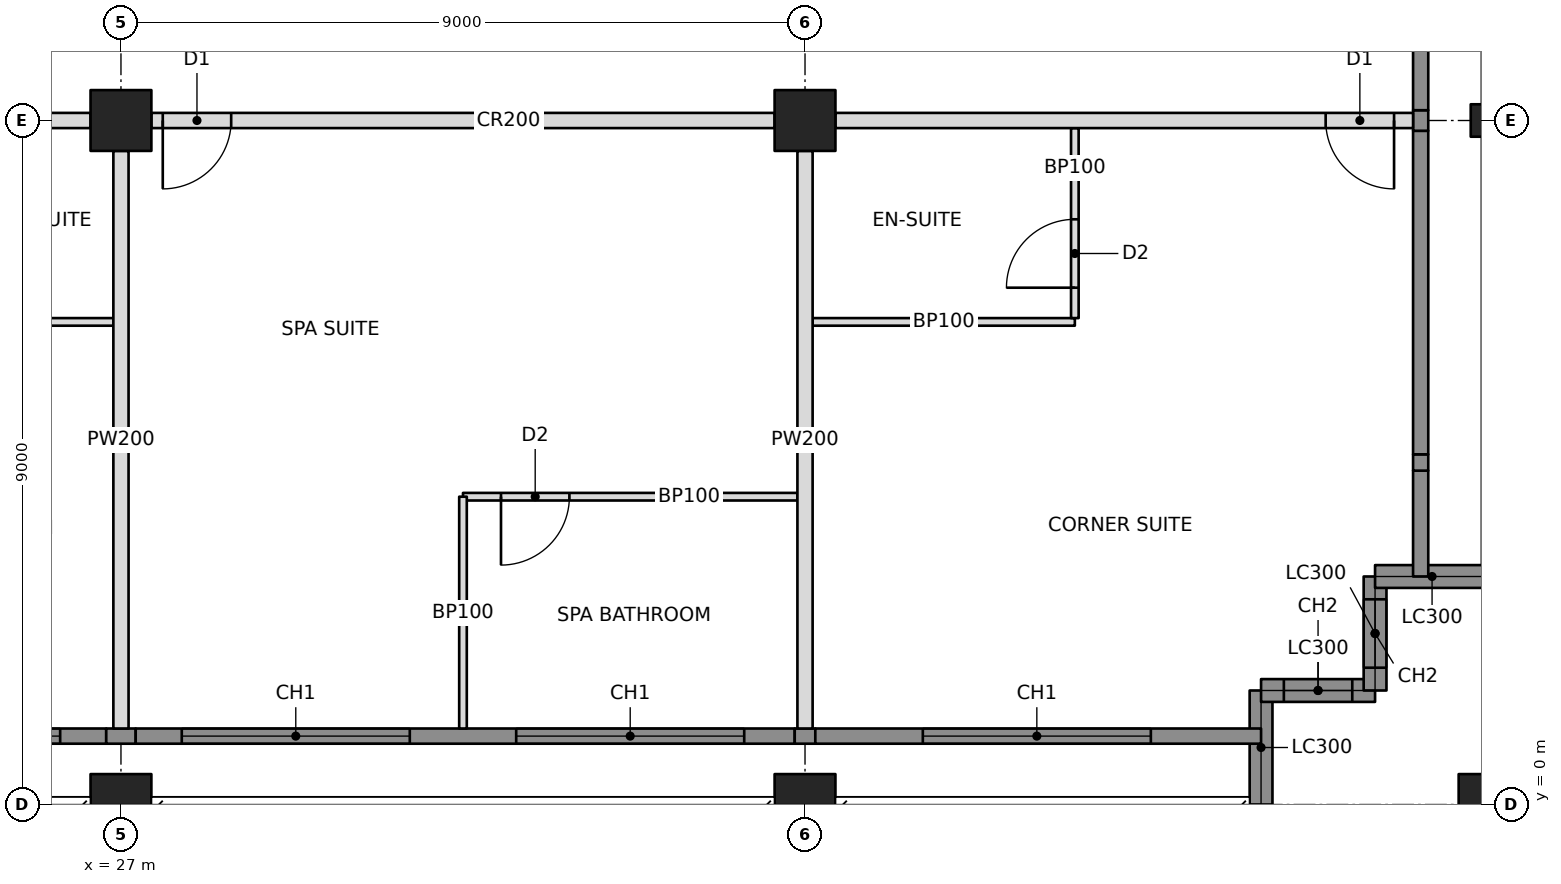
"""IFC4 building model, lengths in metres.
Left out: names, types, materials, properties, quantities, classifications, styles, units other than length and angle.
Written with IfcOpenShell. Run it as: python <this file> out.ifc"""

import sys

from ifc_helpers import new_model, si_unit, direction, frame, frame_2d, origin, origin_2d, place, context, subcontext, project, spatial, rectangle, hollow_rectangle, i_section, extrude, element, fill, save


model = new_model("IFC4")
c1 = context("Model", 3, precision=1e-05, world=origin(), true_north=direction((0.0, 1.0)))
c2 = subcontext(c1, "Body", "Model", "MODEL_VIEW")
j1 = project(units=[si_unit("LENGTHUNIT", "METRE"), si_unit("PLANEANGLEUNIT", "RADIAN")], contexts=[c1])
p1 = place(None, origin())
s1 = spatial("IfcSite", under=j1, at=p1, CompositionType="ELEMENT")
p2 = place(p1, origin())
s2 = spatial("IfcBuilding", under=s1, at=p2, CompositionType="ELEMENT")
p3 = place(p2, frame((0.0, 0.0, 194.4)))
s3 = spatial("IfcBuildingStorey", under=s2, at=p3, CompositionType="ELEMENT", Elevation=194.4)
p4 = place(p3, frame((27.0, 0.0, 0.0), z_axis=(0.0, 0.0, 1.0), x_axis=(1.0, 0.0, 0.0)))
e1 = element("IfcColumn", 1, at=p4, inside=s3, PredefinedType="COLUMN", context=c2, shape_type="SweptSolid", body=[
    extrude(hollow_rectangle(XDim=0.8, YDim=0.8, WallThickness=0.06, at=origin_2d()), origin(), (0.0, 0.0, 1.0), 3.4),
])
p5 = place(p3, frame((27.0, 9.0, 0.0), z_axis=(0.0, 0.0, 1.0), x_axis=(1.0, 0.0, 0.0)))
e2 = element("IfcColumn", 2, at=p5, inside=s3, PredefinedType="COLUMN", context=c2, shape_type="SweptSolid", body=[
    extrude(hollow_rectangle(XDim=0.8, YDim=0.8, WallThickness=0.05, at=origin_2d()), origin(), (0.0, 0.0, 1.0), 3.4),
])
p6 = place(p3, frame((36.0, 0.0, 0.0), z_axis=(0.0, 0.0, 1.0), x_axis=(1.0, 0.0, 0.0)))
e3 = element("IfcColumn", 3, at=p6, inside=s3, PredefinedType="COLUMN", context=c2, shape_type="SweptSolid", body=[
    extrude(hollow_rectangle(XDim=0.8, YDim=0.8, WallThickness=0.06, at=origin_2d()), origin(), (0.0, 0.0, 1.0), 3.4),
])
p7 = place(p3, frame((36.0, 9.0, 0.0), z_axis=(0.0, 0.0, 1.0), x_axis=(0.0, 1.0, 0.0)))
e4 = element("IfcColumn", 4, at=p7, inside=s3, PredefinedType="COLUMN", context=c2, shape_type="SweptSolid", body=[
    extrude(hollow_rectangle(XDim=0.8, YDim=0.8, WallThickness=0.05, at=origin_2d()), origin(), (0.0, 0.0, 1.0), 3.4),
])
p8 = place(p3, frame((45.0, 0.0, 0.0), z_axis=(0.0, 0.0, 1.0), x_axis=(1.0, 0.0, 0.0)))
e5 = element("IfcColumn", 5, at=p8, inside=s3, PredefinedType="COLUMN", context=c2, shape_type="SweptSolid", body=[
    extrude(hollow_rectangle(XDim=0.8, YDim=0.8, WallThickness=0.06, at=origin_2d()), origin(), (0.0, 0.0, 1.0), 3.4),
])
p9 = place(p3, frame((45.0, 9.0, 0.0), z_axis=(0.0, 0.0, 1.0), x_axis=(0.0, 1.0, 0.0)))
e6 = element("IfcColumn", 6, at=p9, inside=s3, PredefinedType="COLUMN", context=c2, shape_type="SweptSolid", body=[
    extrude(i_section(OverallWidth=0.427, OverallDepth=0.483, WebThickness=0.051, FlangeThickness=0.082, at=origin_2d()), origin(), (0.0, 0.0, 1.0), 3.4),
])
p10 = place(p3, frame((42.0, 0.0, 0.0), z_axis=(0.0, 0.0, 1.0), x_axis=(0.0, 1.0, 0.0)))
e7 = element("IfcWall", 7, at=p10, inside=s3, PredefinedType="SOLIDWALL", context=c2, shape_type="SweptSolid", body=[
    extrude(rectangle(XDim=1.5, YDim=0.3, at=frame_2d((0.75, 0.0))), origin(), (0.0, 0.0, 1.0), 2.42),
])
p11 = place(p3, frame((42.0, 1.5, 0.0), z_axis=(0.0, 0.0, 1.0), x_axis=(1.0, 0.0, 0.0)))
e8 = element("IfcWall", 8, at=p11, inside=s3, PredefinedType="SOLIDWALL", context=c2, shape_type="SweptSolid", body=[
    extrude(rectangle(XDim=1.5, YDim=0.3, at=frame_2d((0.75, 0.0))), origin(), (0.0, 0.0, 1.0), 3.2),
])
p12 = place(p11, frame((0.3, 0.0, 0.6)))
e9 = element("IfcOpeningElement", 9, at=p12, cuts=e8, PredefinedType="OPENING", context=c2, shape_type="SweptSolid", body=[
    extrude(rectangle(XDim=0.9, YDim=2.2, at=frame_2d((0.45, 1.1))), frame((0.0, 0.16, 0.0), z_axis=(0.0, -1.0, 0.0), x_axis=(1.0, 0.0, 0.0)), (0.0, 0.0, 1.0), 0.32),
])
p13 = place(p3, frame((43.5, 1.5, 0.0), z_axis=(0.0, 0.0, 1.0), x_axis=(0.0, 1.0, 0.0)))
e10 = element("IfcWall", 10, at=p13, inside=s3, PredefinedType="SOLIDWALL", context=c2, shape_type="SweptSolid", body=[
    extrude(rectangle(XDim=1.5, YDim=0.3, at=frame_2d((0.75, 0.0))), origin(), (0.0, 0.0, 1.0), 3.2),
])
p14 = place(p13, frame((0.3, 0.0, 0.6)))
e11 = element("IfcOpeningElement", 11, at=p14, cuts=e10, PredefinedType="OPENING", context=c2, shape_type="SweptSolid", body=[
    extrude(rectangle(XDim=0.9, YDim=2.2, at=frame_2d((0.45, 1.1))), frame((0.0, 0.16, 0.0), z_axis=(0.0, -1.0, 0.0), x_axis=(1.0, 0.0, 0.0)), (0.0, 0.0, 1.0), 0.32),
])
p15 = place(p3, frame((43.5, 3.0, 0.0), z_axis=(0.0, 0.0, 1.0), x_axis=(1.0, 0.0, 0.0)))
e12 = element("IfcWall", 12, at=p15, inside=s3, PredefinedType="SOLIDWALL", context=c2, shape_type="SweptSolid", body=[
    extrude(rectangle(XDim=1.5, YDim=0.3, at=frame_2d((0.75, 0.0))), origin(), (0.0, 0.0, 1.0), 2.42),
])
p16 = place(p3, frame((44.1, 3.0, 0.0), z_axis=(0.0, 0.0, 1.0), x_axis=(0.0, 1.0, 0.0)))
e13 = element("IfcWall", 13, at=p16, inside=s3, PredefinedType="SOLIDWALL", context=c2, shape_type="SweptSolid", body=[
    extrude(rectangle(XDim=1.393, YDim=0.2, at=frame_2d((0.696, 0.0))), origin(), (0.0, 0.0, 1.0), 3.2),
])
p17 = place(p3, frame((18.4, 9.0, 0.0), z_axis=(0.0, 0.0, 1.0), x_axis=(1.0, 0.0, 0.0)))
e14 = element("IfcWall", 14, at=p17, inside=s3, PredefinedType="PARTITIONING", context=c2, shape_type="SweptSolid", body=[
    extrude(rectangle(XDim=8.2, YDim=0.2, at=frame_2d((4.1, 0.0))), origin(), (0.0, 0.0, 1.0), 2.405),
])
p18 = place(p17, frame((4.35, 0.0, 0.0)))
e15 = element("IfcOpeningElement", 15, at=p18, cuts=e14, PredefinedType="OPENING", context=c2, shape_type="SweptSolid", body=[
    extrude(rectangle(XDim=0.9, YDim=2.1, at=frame_2d((0.45, 1.05))), frame((0.0, 0.11, 0.0), z_axis=(0.0, -1.0, 0.0), x_axis=(1.0, 0.0, 0.0)), (0.0, 0.0, 1.0), 0.22),
])
p19 = place(p3, frame((27.4, 9.0, 0.0), z_axis=(0.0, 0.0, 1.0), x_axis=(1.0, 0.0, 0.0)))
e16 = element("IfcWall", 16, at=p19, inside=s3, PredefinedType="PARTITIONING", context=c2, shape_type="SweptSolid", body=[
    extrude(rectangle(XDim=8.2, YDim=0.2, at=frame_2d((4.1, 0.0))), origin(), (0.0, 0.0, 1.0), 2.405),
])
p20 = place(p19, frame((0.15, 0.0, 0.0)))
e17 = element("IfcOpeningElement", 17, at=p20, cuts=e16, PredefinedType="OPENING", context=c2, shape_type="SweptSolid", body=[
    extrude(rectangle(XDim=0.9, YDim=2.1, at=frame_2d((0.45, 1.05))), frame((0.0, 0.11, 0.0), z_axis=(0.0, -1.0, 0.0), x_axis=(1.0, 0.0, 0.0)), (0.0, 0.0, 1.0), 0.22),
])
p21 = place(p3, frame((36.4, 9.0, 0.0), z_axis=(0.0, 0.0, 1.0), x_axis=(1.0, 0.0, 0.0)))
e18 = element("IfcWall", 18, at=p21, inside=s3, PredefinedType="PARTITIONING", context=c2, shape_type="SweptSolid", body=[
    extrude(rectangle(XDim=7.6, YDim=0.2, at=frame_2d((3.8, 0.0))), origin(), (0.0, 0.0, 1.0), 2.438),
])
p22 = place(p21, frame((6.45, 0.0, 0.0)))
e19 = element("IfcOpeningElement", 19, at=p22, cuts=e18, PredefinedType="OPENING", context=c2, shape_type="SweptSolid", body=[
    extrude(rectangle(XDim=0.9, YDim=2.1, at=frame_2d((0.45, 1.05))), frame((0.0, 0.11, 0.0), z_axis=(0.0, -1.0, 0.0), x_axis=(1.0, 0.0, 0.0)), (0.0, 0.0, 1.0), 0.22),
])
p23 = place(p3, frame((27.0, 8.6, 0.0), z_axis=(0.0, 0.0, 1.0), x_axis=(0.0, -1.0, 0.0)))
e20 = element("IfcWall", 20, at=p23, inside=s3, PredefinedType="PARTITIONING", context=c2, shape_type="SweptSolid", body=[
    extrude(rectangle(XDim=7.6, YDim=0.2, at=frame_2d((3.8, 0.0))), origin(), (0.0, 0.0, 1.0), 2.405),
])
p24 = place(p3, frame((36.0, 8.6, 0.0), z_axis=(0.0, 0.0, 1.0), x_axis=(0.0, -1.0, 0.0)))
e21 = element("IfcWall", 21, at=p24, inside=s3, PredefinedType="PARTITIONING", context=c2, shape_type="SweptSolid", body=[
    extrude(rectangle(XDim=7.6, YDim=0.2, at=frame_2d((3.8, 0.0))), origin(), (0.0, 0.0, 1.0), 2.438),
])
p25 = place(p3, frame((23.95, 6.35, 0.0), z_axis=(0.0, 0.0, 1.0), x_axis=(1.0, 0.0, 0.0)))
e22 = element("IfcWall", 22, at=p25, inside=s3, PredefinedType="PARTITIONING", context=c2, shape_type="SweptSolid", body=[
    extrude(rectangle(XDim=2.95, YDim=0.1, at=frame_2d((1.475, 0.0))), origin(), (0.0, 0.0, 1.0), 2.404),
])
p26 = place(p3, frame((31.5, 4.05, 0.0), z_axis=(0.0, 0.0, 1.0), x_axis=(1.0, 0.0, 0.0)))
e23 = element("IfcWall", 23, at=p26, inside=s3, PredefinedType="PARTITIONING", context=c2, shape_type="SweptSolid", body=[
    extrude(rectangle(XDim=4.4, YDim=0.1, at=frame_2d((2.2, 0.0))), origin(), (0.0, 0.0, 1.0), 2.438),
])
p27 = place(p26, frame((0.5, 0.0, 0.0)))
e24 = element("IfcOpeningElement", 24, at=p27, cuts=e23, PredefinedType="OPENING", context=c2, shape_type="SweptSolid", body=[
    extrude(rectangle(XDim=0.9, YDim=2.1, at=frame_2d((0.45, 1.05))), frame((0.0, 0.06, 0.0), z_axis=(0.0, -1.0, 0.0), x_axis=(1.0, 0.0, 0.0)), (0.0, 0.0, 1.0), 0.12),
])
p28 = place(p3, frame((31.5, 4.05, 0.0), z_axis=(0.0, 0.0, 1.0), x_axis=(0.0, -1.0, 0.0)))
e25 = element("IfcWall", 25, at=p28, inside=s3, PredefinedType="PARTITIONING", context=c2, shape_type="SweptSolid", body=[
    extrude(rectangle(XDim=3.05, YDim=0.1, at=frame_2d((1.525, 0.0))), origin(), (0.0, 0.0, 1.0), 3.2),
])
p29 = place(p3, frame((36.1, 6.35, 0.0), z_axis=(0.0, 0.0, 1.0), x_axis=(1.0, 0.0, 0.0)))
e26 = element("IfcWall", 26, at=p29, inside=s3, PredefinedType="PARTITIONING", context=c2, shape_type="SweptSolid", body=[
    extrude(rectangle(XDim=3.45, YDim=0.1, at=frame_2d((1.725, 0.0))), origin(), (0.0, 0.0, 1.0), 2.438),
])
p30 = place(p3, frame((39.55, 8.9, 0.0), z_axis=(0.0, 0.0, 1.0), x_axis=(0.0, -1.0, 0.0)))
e27 = element("IfcWall", 27, at=p30, inside=s3, PredefinedType="PARTITIONING", context=c2, shape_type="SweptSolid", body=[
    extrude(rectangle(XDim=2.5, YDim=0.1, at=frame_2d((1.25, 0.0))), origin(), (0.0, 0.0, 1.0), 2.438),
])
p31 = place(p30, frame((1.2, 0.0, 0.0)))
e28 = element("IfcOpeningElement", 28, at=p31, cuts=e27, PredefinedType="OPENING", context=c2, shape_type="SweptSolid", body=[
    extrude(rectangle(XDim=0.9, YDim=2.1, at=frame_2d((0.45, 1.05))), frame((0.0, 0.06, 0.0), z_axis=(0.0, -1.0, 0.0), x_axis=(1.0, 0.0, 0.0)), (0.0, 0.0, 1.0), 0.12),
])
p32 = place(p3, frame((18.194, 0.9, 0.0), z_axis=(0.0, 0.0, 1.0), x_axis=(1.0, 0.0, 0.0)))
e29 = element("IfcWall", 29, at=p32, inside=s3, PredefinedType="SOLIDWALL", context=c2, shape_type="SweptSolid", body=[
    extrude(rectangle(XDim=8.612, YDim=0.2, at=frame_2d((4.306, 0.0))), origin(), (0.0, 0.0, 1.0), 3.2),
])
p33 = place(p32, frame((0.606, 0.0, 0.6)))
e30 = element("IfcOpeningElement", 30, at=p33, cuts=e29, PredefinedType="OPENING", context=c2, shape_type="SweptSolid", body=[
    extrude(rectangle(XDim=3.0, YDim=2.2, at=frame_2d((1.5, 1.1))), frame((0.0, 0.11, 0.0), z_axis=(0.0, -1.0, 0.0), x_axis=(1.0, 0.0, 0.0)), (0.0, 0.0, 1.0), 0.22),
])
p34 = place(p32, frame((5.006, 0.0, 0.6)))
e31 = element("IfcOpeningElement", 31, at=p34, cuts=e29, PredefinedType="OPENING", context=c2, shape_type="SweptSolid", body=[
    extrude(rectangle(XDim=3.0, YDim=2.2, at=frame_2d((1.5, 1.1))), frame((0.0, 0.11, 0.0), z_axis=(0.0, -1.0, 0.0), x_axis=(1.0, 0.0, 0.0)), (0.0, 0.0, 1.0), 0.22),
])
p35 = place(p3, frame((26.806, 0.9, 0.0), z_axis=(0.0, 0.0, 1.0), x_axis=(1.0, 0.0, 0.0)))
e32 = element("IfcWall", 32, at=p35, inside=s3, PredefinedType="SOLIDWALL", context=c2, shape_type="SweptSolid", body=[
    extrude(rectangle(XDim=0.388, YDim=0.2, at=frame_2d((0.194, 0.0))), origin(), (0.0, 0.0, 1.0), 2.404),
])
p36 = place(p3, frame((27.194, 0.9, 0.0), z_axis=(0.0, 0.0, 1.0), x_axis=(1.0, 0.0, 0.0)))
e33 = element("IfcWall", 33, at=p36, inside=s3, PredefinedType="SOLIDWALL", context=c2, shape_type="SweptSolid", body=[
    extrude(rectangle(XDim=8.671, YDim=0.2, at=frame_2d((4.335, 0.0))), origin(), (0.0, 0.0, 1.0), 3.2),
])
p37 = place(p36, frame((0.606, 0.0, 0.6)))
e34 = element("IfcOpeningElement", 34, at=p37, cuts=e33, PredefinedType="OPENING", context=c2, shape_type="SweptSolid", body=[
    extrude(rectangle(XDim=3.0, YDim=2.2, at=frame_2d((1.5, 1.1))), frame((0.0, 0.11, 0.0), z_axis=(0.0, -1.0, 0.0), x_axis=(1.0, 0.0, 0.0)), (0.0, 0.0, 1.0), 0.22),
])
p38 = place(p36, frame((5.006, 0.0, 0.6)))
e35 = element("IfcOpeningElement", 35, at=p38, cuts=e33, PredefinedType="OPENING", context=c2, shape_type="SweptSolid", body=[
    extrude(rectangle(XDim=3.0, YDim=2.2, at=frame_2d((1.5, 1.1))), frame((0.0, 0.11, 0.0), z_axis=(0.0, -1.0, 0.0), x_axis=(1.0, 0.0, 0.0)), (0.0, 0.0, 1.0), 0.22),
])
p39 = place(p3, frame((35.865, 0.9, 0.0), z_axis=(0.0, 0.0, 1.0), x_axis=(1.0, 0.0, 0.0)))
e36 = element("IfcWall", 36, at=p39, inside=s3, PredefinedType="SOLIDWALL", context=c2, shape_type="SweptSolid", body=[
    extrude(rectangle(XDim=0.271, YDim=0.2, at=frame_2d((0.135, 0.0))), origin(), (0.0, 0.0, 1.0), 2.438),
])
p40 = place(p3, frame((36.135, 0.9, 0.0), z_axis=(0.0, 0.0, 1.0), x_axis=(1.0, 0.0, 0.0)))
e37 = element("IfcWall", 37, at=p40, inside=s3, PredefinedType="SOLIDWALL", context=c2, shape_type="SweptSolid", body=[
    extrude(rectangle(XDim=5.865, YDim=0.2, at=frame_2d((2.932, 0.0))), origin(), (0.0, 0.0, 1.0), 3.2),
])
p41 = place(p40, frame((1.415, 0.0, 0.6)))
e38 = element("IfcOpeningElement", 38, at=p41, cuts=e37, PredefinedType="OPENING", context=c2, shape_type="SweptSolid", body=[
    extrude(rectangle(XDim=3.0, YDim=2.2, at=frame_2d((1.5, 1.1))), frame((0.0, 0.11, 0.0), z_axis=(0.0, -1.0, 0.0), x_axis=(1.0, 0.0, 0.0)), (0.0, 0.0, 1.0), 0.22),
])
p42 = place(p3, frame((44.1, 4.393, 0.0), z_axis=(0.0, 0.0, 1.0), x_axis=(0.0, 1.0, 0.0)))
e39 = element("IfcWall", 39, at=p42, inside=s3, PredefinedType="SOLIDWALL", context=c2, shape_type="SweptSolid", body=[
    extrude(rectangle(XDim=0.215, YDim=0.2, at=frame_2d((0.107, 0.0))), origin(), (0.0, 0.0, 1.0), 2.661),
])
p43 = place(p3, frame((44.1, 4.607, 0.0), z_axis=(0.0, 0.0, 1.0), x_axis=(0.0, 1.0, 0.0)))
e40 = element("IfcWall", 40, at=p43, inside=s3, PredefinedType="SOLIDWALL", context=c2, shape_type="SweptSolid", body=[
    extrude(rectangle(XDim=4.257, YDim=0.2, at=frame_2d((2.129, 0.0))), origin(), (0.0, 0.0, 1.0), 3.2),
])
p44 = place(p3, frame((44.1, 8.865, 0.0), z_axis=(0.0, 0.0, 1.0), x_axis=(0.0, 1.0, 0.0)))
e41 = element("IfcWall", 41, at=p44, inside=s3, PredefinedType="SOLIDWALL", context=c2, shape_type="SweptSolid", body=[
    extrude(rectangle(XDim=0.271, YDim=0.2, at=frame_2d((0.135, 0.0))), origin(), (0.0, 0.0, 1.0), 2.438),
])
p45 = place(p3, frame((44.1, 9.135, 0.0), z_axis=(0.0, 0.0, 1.0), x_axis=(0.0, 1.0, 0.0)))
e42 = element("IfcWall", 42, at=p45, inside=s3, PredefinedType="SOLIDWALL", context=c2, shape_type="SweptSolid", body=[
    extrude(rectangle(XDim=8.671, YDim=0.2, at=frame_2d((4.335, 0.0))), origin(), (0.0, 0.0, 1.0), 3.2),
])
p46 = place(p45, frame((2.015, 0.0, 0.6)))
e43 = element("IfcOpeningElement", 43, at=p46, cuts=e42, PredefinedType="OPENING", context=c2, shape_type="SweptSolid", body=[
    extrude(rectangle(XDim=3.0, YDim=2.2, at=frame_2d((1.5, 1.1))), frame((0.0, 0.11, 0.0), z_axis=(0.0, -1.0, 0.0), x_axis=(1.0, 0.0, 0.0)), (0.0, 0.0, 1.0), 0.22),
])
p47 = place(p45, frame((5.515, 0.0, 0.6)))
e44 = element("IfcOpeningElement", 44, at=p47, cuts=e42, PredefinedType="OPENING", context=c2, shape_type="SweptSolid", body=[
    extrude(rectangle(XDim=3.0, YDim=2.2, at=frame_2d((1.5, 1.1))), frame((0.0, 0.11, 0.0), z_axis=(0.0, -1.0, 0.0), x_axis=(1.0, 0.0, 0.0)), (0.0, 0.0, 1.0), 0.22),
])
p48 = place(p12, origin())
e45 = element("IfcWindow", 45, at=p48, inside=s3, PartitioningType="SINGLE_PANEL", PredefinedType="WINDOW", context=c2, shape_type="SweptSolid", body=[
    extrude(rectangle(XDim=0.9, YDim=2.2, at=frame_2d((0.45, 1.1))), frame((0.0, 0.03, 0.0), z_axis=(0.0, -1.0, 0.0), x_axis=(1.0, 0.0, 0.0)), (0.0, 0.0, 1.0), 0.06),
])
fill(e9, e45)
p49 = place(p14, origin())
e46 = element("IfcWindow", 46, at=p49, inside=s3, PartitioningType="SINGLE_PANEL", PredefinedType="WINDOW", context=c2, shape_type="SweptSolid", body=[
    extrude(rectangle(XDim=0.9, YDim=2.2, at=frame_2d((0.45, 1.1))), frame((0.0, 0.03, 0.0), z_axis=(0.0, -1.0, 0.0), x_axis=(1.0, 0.0, 0.0)), (0.0, 0.0, 1.0), 0.06),
])
fill(e11, e46)
p50 = place(p34, origin())
e47 = element("IfcWindow", 47, at=p50, inside=s3, PartitioningType="TRIPLE_PANEL_VERTICAL", PredefinedType="WINDOW", context=c2, shape_type="SweptSolid", body=[
    extrude(rectangle(XDim=3.0, YDim=2.2, at=frame_2d((1.5, 1.1))), frame((0.0, 0.03, 0.0), z_axis=(0.0, -1.0, 0.0), x_axis=(1.0, 0.0, 0.0)), (0.0, 0.0, 1.0), 0.06),
])
fill(e31, e47)
p51 = place(p37, origin())
e48 = element("IfcWindow", 48, at=p51, inside=s3, PartitioningType="TRIPLE_PANEL_VERTICAL", PredefinedType="WINDOW", context=c2, shape_type="SweptSolid", body=[
    extrude(rectangle(XDim=3.0, YDim=2.2, at=frame_2d((1.5, 1.1))), frame((0.0, 0.03, 0.0), z_axis=(0.0, -1.0, 0.0), x_axis=(1.0, 0.0, 0.0)), (0.0, 0.0, 1.0), 0.06),
])
fill(e34, e48)
p52 = place(p38, origin())
e49 = element("IfcWindow", 49, at=p52, inside=s3, PartitioningType="TRIPLE_PANEL_VERTICAL", PredefinedType="WINDOW", context=c2, shape_type="SweptSolid", body=[
    extrude(rectangle(XDim=3.0, YDim=2.2, at=frame_2d((1.5, 1.1))), frame((0.0, 0.03, 0.0), z_axis=(0.0, -1.0, 0.0), x_axis=(1.0, 0.0, 0.0)), (0.0, 0.0, 1.0), 0.06),
])
fill(e35, e49)
p53 = place(p41, origin())
e50 = element("IfcWindow", 50, at=p53, inside=s3, PartitioningType="TRIPLE_PANEL_VERTICAL", PredefinedType="WINDOW", context=c2, shape_type="SweptSolid", body=[
    extrude(rectangle(XDim=3.0, YDim=2.2, at=frame_2d((1.5, 1.1))), frame((0.0, 0.03, 0.0), z_axis=(0.0, -1.0, 0.0), x_axis=(1.0, 0.0, 0.0)), (0.0, 0.0, 1.0), 0.06),
])
fill(e38, e50)
p54 = place(p27, frame((0.9, 0.0, 0.0), z_axis=(0.0, 0.0, 1.0), x_axis=(-1.0, 0.0, 0.0)))
e51 = element("IfcDoor", 51, at=p54, inside=s3, OperationType="SINGLE_SWING_RIGHT", PredefinedType="DOOR", context=c2, shape_type="SweptSolid", body=[
    extrude(rectangle(XDim=0.9, YDim=2.1, at=frame_2d((0.45, 1.05))), frame((0.0, 0.025, 0.0), z_axis=(0.0, -1.0, 0.0), x_axis=(1.0, 0.0, 0.0)), (0.0, 0.0, 1.0), 0.05),
])
fill(e24, e51)
p55 = place(p20, frame((0.9, 0.0, 0.0), z_axis=(0.0, 0.0, 1.0), x_axis=(-1.0, 0.0, 0.0)))
e52 = element("IfcDoor", 52, at=p55, inside=s3, OperationType="SINGLE_SWING_RIGHT", PredefinedType="DOOR", context=c2, shape_type="SweptSolid", body=[
    extrude(rectangle(XDim=0.9, YDim=2.1, at=frame_2d((0.45, 1.05))), frame((0.0, 0.025, 0.0), z_axis=(0.0, -1.0, 0.0), x_axis=(1.0, 0.0, 0.0)), (0.0, 0.0, 1.0), 0.05),
])
fill(e17, e52)
p56 = place(p31, frame((0.9, 0.0, 0.0), z_axis=(0.0, 0.0, 1.0), x_axis=(-1.0, 0.0, 0.0)))
e53 = element("IfcDoor", 53, at=p56, inside=s3, OperationType="SINGLE_SWING_LEFT", PredefinedType="DOOR", context=c2, shape_type="SweptSolid", body=[
    extrude(rectangle(XDim=0.9, YDim=2.1, at=frame_2d((0.45, 1.05))), frame((0.0, 0.025, 0.0), z_axis=(0.0, -1.0, 0.0), x_axis=(1.0, 0.0, 0.0)), (0.0, 0.0, 1.0), 0.05),
])
fill(e28, e53)
p57 = place(p22, frame((0.9, 0.0, 0.0), z_axis=(0.0, 0.0, 1.0), x_axis=(-1.0, 0.0, 0.0)))
e54 = element("IfcDoor", 54, at=p57, inside=s3, OperationType="SINGLE_SWING_LEFT", PredefinedType="DOOR", context=c2, shape_type="SweptSolid", body=[
    extrude(rectangle(XDim=0.9, YDim=2.1, at=frame_2d((0.45, 1.05))), frame((0.0, 0.025, 0.0), z_axis=(0.0, -1.0, 0.0), x_axis=(1.0, 0.0, 0.0)), (0.0, 0.0, 1.0), 0.05),
])
fill(e19, e54)
save(model, sys.argv[1])
